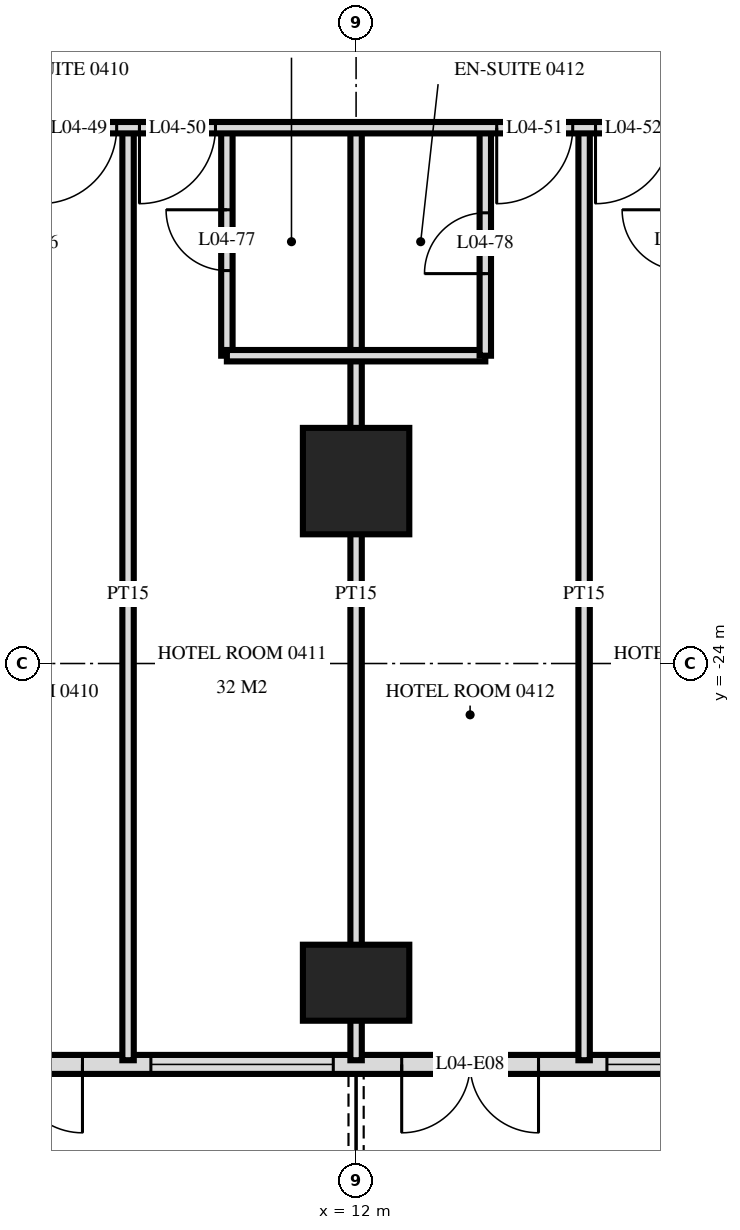
"""IFC4 building model, lengths in metres.
Left out: names, types, materials, properties, quantities, classifications, styles, units other than length and angle.
Written with IfcOpenShell. Run it as: python <this file> out.ifc"""

import sys

from ifc_helpers import new_model, si_unit, direction, frame, frame_2d, origin, origin_2d, place, context, subcontext, project, spatial, rectangle, extrude, element, fill, save


model = new_model("IFC4")
c1 = context("Model", 3, precision=1e-05, world=origin(), true_north=direction((0.0, 1.0)))
c2 = subcontext(c1, "Body", "Model", "MODEL_VIEW")
j1 = project(units=[si_unit("LENGTHUNIT", "METRE"), si_unit("PLANEANGLEUNIT", "RADIAN")], contexts=[c1])
p1 = place(None, origin())
s1 = spatial("IfcSite", under=j1, at=p1, CompositionType="ELEMENT")
p2 = place(p1, origin())
s2 = spatial("IfcBuilding", under=s1, at=p2, CompositionType="ELEMENT")
p3 = place(p2, frame((0.0, 0.0, 24.0)))
s3 = spatial("IfcBuildingStorey", under=s2, at=p3, CompositionType="ELEMENT", Elevation=24.0)
p4 = place(p3, frame((12.0, -28.2, -0.28), z_axis=(0.0, 0.0, 1.0), x_axis=(1.0, 0.0, 0.0)))
e1 = element("IfcColumn", 1, at=p4, inside=s3, PredefinedType="COLUMN", context=c2, shape_type="SweptSolid", body=[
    extrude(rectangle(XDim=1.4, YDim=1.0, at=origin_2d()), origin(), (0.0, 0.0, 1.0), 3.88),
])
p5 = place(p3, frame((12.0, -21.6, -0.28), z_axis=(0.0, 0.0, 1.0), x_axis=(1.0, 0.0, 0.0)))
e2 = element("IfcColumn", 2, at=p5, inside=s3, PredefinedType="COLUMN", context=c2, shape_type="SweptSolid", body=[
    extrude(rectangle(XDim=1.4, YDim=1.4, at=origin_2d()), origin(), (0.0, 0.0, 1.0), 3.88),
])
p6 = place(p3, frame((-28.775, -29.275, 0.0), z_axis=(0.0, 0.0, 1.0), x_axis=(1.0, 0.0, 0.0)))
e3 = element("IfcWall", 3, at=p6, inside=s3, PredefinedType="SOLIDWALL", context=c2, shape_type="SweptSolid", body=[
    extrude(rectangle(XDim=57.551, YDim=0.25, at=frame_2d((28.775, 0.0))), origin(), (0.0, 0.0, 1.0), 3.32),
])
p7 = place(p6, frame((0.575, 0.0, 0.0)))
e4 = element("IfcOpeningElement", 4, at=p7, cuts=e3, PredefinedType="OPENING", context=c2, shape_type="SweptSolid", body=[
    extrude(rectangle(XDim=1.8, YDim=2.4, at=frame_2d((0.9, 1.2))), frame((0.0, 0.135, 0.0), z_axis=(0.0, -1.0, 0.0), x_axis=(1.0, 0.0, 0.0)), (0.0, 0.0, 1.0), 0.27),
])
p8 = place(p6, frame((5.375, 0.0, 0.0)))
e5 = element("IfcOpeningElement", 5, at=p8, cuts=e3, PredefinedType="OPENING", context=c2, shape_type="SweptSolid", body=[
    extrude(rectangle(XDim=1.8, YDim=2.4, at=frame_2d((0.9, 1.2))), frame((0.0, 0.135, 0.0), z_axis=(0.0, -1.0, 0.0), x_axis=(1.0, 0.0, 0.0)), (0.0, 0.0, 1.0), 0.27),
])
p9 = place(p6, frame((8.075, 0.0, 0.3)))
e6 = element("IfcOpeningElement", 6, at=p9, cuts=e3, PredefinedType="OPENING", context=c2, shape_type="SweptSolid", body=[
    extrude(rectangle(XDim=2.4, YDim=2.1, at=frame_2d((1.2, 1.05))), frame((0.0, 0.135, 0.0), z_axis=(0.0, -1.0, 0.0), x_axis=(1.0, 0.0, 0.0)), (0.0, 0.0, 1.0), 0.27),
])
p10 = place(p6, frame((11.375, 0.0, 0.0)))
e7 = element("IfcOpeningElement", 7, at=p10, cuts=e3, PredefinedType="OPENING", context=c2, shape_type="SweptSolid", body=[
    extrude(rectangle(XDim=1.8, YDim=2.4, at=frame_2d((0.9, 1.2))), frame((0.0, 0.135, 0.0), z_axis=(0.0, -1.0, 0.0), x_axis=(1.0, 0.0, 0.0)), (0.0, 0.0, 1.0), 0.27),
])
p11 = place(p6, frame((14.075, 0.0, 0.3)))
e8 = element("IfcOpeningElement", 8, at=p11, cuts=e3, PredefinedType="OPENING", context=c2, shape_type="SweptSolid", body=[
    extrude(rectangle(XDim=2.4, YDim=2.1, at=frame_2d((1.2, 1.05))), frame((0.0, 0.135, 0.0), z_axis=(0.0, -1.0, 0.0), x_axis=(1.0, 0.0, 0.0)), (0.0, 0.0, 1.0), 0.27),
])
p12 = place(p6, frame((17.375, 0.0, 0.0)))
e9 = element("IfcOpeningElement", 9, at=p12, cuts=e3, PredefinedType="OPENING", context=c2, shape_type="SweptSolid", body=[
    extrude(rectangle(XDim=1.8, YDim=2.4, at=frame_2d((0.9, 1.2))), frame((0.0, 0.135, 0.0), z_axis=(0.0, -1.0, 0.0), x_axis=(1.0, 0.0, 0.0)), (0.0, 0.0, 1.0), 0.27),
])
p13 = place(p6, frame((20.075, 0.0, 0.3)))
e10 = element("IfcOpeningElement", 10, at=p13, cuts=e3, PredefinedType="OPENING", context=c2, shape_type="SweptSolid", body=[
    extrude(rectangle(XDim=2.4, YDim=2.1, at=frame_2d((1.2, 1.05))), frame((0.0, 0.135, 0.0), z_axis=(0.0, -1.0, 0.0), x_axis=(1.0, 0.0, 0.0)), (0.0, 0.0, 1.0), 0.27),
])
p14 = place(p6, frame((23.075, 0.0, 0.3)))
e11 = element("IfcOpeningElement", 11, at=p14, cuts=e3, PredefinedType="OPENING", context=c2, shape_type="SweptSolid", body=[
    extrude(rectangle(XDim=2.4, YDim=2.1, at=frame_2d((1.2, 1.05))), frame((0.0, 0.135, 0.0), z_axis=(0.0, -1.0, 0.0), x_axis=(1.0, 0.0, 0.0)), (0.0, 0.0, 1.0), 0.27),
])
p15 = place(p6, frame((26.375, 0.0, 0.0)))
e12 = element("IfcOpeningElement", 12, at=p15, cuts=e3, PredefinedType="OPENING", context=c2, shape_type="SweptSolid", body=[
    extrude(rectangle(XDim=1.8, YDim=2.4, at=frame_2d((0.9, 1.2))), frame((0.0, 0.135, 0.0), z_axis=(0.0, -1.0, 0.0), x_axis=(1.0, 0.0, 0.0)), (0.0, 0.0, 1.0), 0.27),
])
p16 = place(p6, frame((29.375, 0.0, 0.0)))
e13 = element("IfcOpeningElement", 13, at=p16, cuts=e3, PredefinedType="OPENING", context=c2, shape_type="SweptSolid", body=[
    extrude(rectangle(XDim=1.8, YDim=2.4, at=frame_2d((0.9, 1.2))), frame((0.0, 0.135, 0.0), z_axis=(0.0, -1.0, 0.0), x_axis=(1.0, 0.0, 0.0)), (0.0, 0.0, 1.0), 0.27),
])
p17 = place(p6, frame((32.075, 0.0, 0.3)))
e14 = element("IfcOpeningElement", 14, at=p17, cuts=e3, PredefinedType="OPENING", context=c2, shape_type="SweptSolid", body=[
    extrude(rectangle(XDim=2.4, YDim=2.1, at=frame_2d((1.2, 1.05))), frame((0.0, 0.135, 0.0), z_axis=(0.0, -1.0, 0.0), x_axis=(1.0, 0.0, 0.0)), (0.0, 0.0, 1.0), 0.27),
])
p18 = place(p6, frame((35.375, 0.0, 0.0)))
e15 = element("IfcOpeningElement", 15, at=p18, cuts=e3, PredefinedType="OPENING", context=c2, shape_type="SweptSolid", body=[
    extrude(rectangle(XDim=1.8, YDim=2.4, at=frame_2d((0.9, 1.2))), frame((0.0, 0.135, 0.0), z_axis=(0.0, -1.0, 0.0), x_axis=(1.0, 0.0, 0.0)), (0.0, 0.0, 1.0), 0.27),
])
p19 = place(p6, frame((38.075, 0.0, 0.3)))
e16 = element("IfcOpeningElement", 16, at=p19, cuts=e3, PredefinedType="OPENING", context=c2, shape_type="SweptSolid", body=[
    extrude(rectangle(XDim=2.4, YDim=2.1, at=frame_2d((1.2, 1.05))), frame((0.0, 0.135, 0.0), z_axis=(0.0, -1.0, 0.0), x_axis=(1.0, 0.0, 0.0)), (0.0, 0.0, 1.0), 0.27),
])
p20 = place(p6, frame((41.375, 0.0, 0.0)))
e17 = element("IfcOpeningElement", 17, at=p20, cuts=e3, PredefinedType="OPENING", context=c2, shape_type="SweptSolid", body=[
    extrude(rectangle(XDim=1.8, YDim=2.4, at=frame_2d((0.9, 1.2))), frame((0.0, 0.135, 0.0), z_axis=(0.0, -1.0, 0.0), x_axis=(1.0, 0.0, 0.0)), (0.0, 0.0, 1.0), 0.27),
])
p21 = place(p6, frame((44.075, 0.0, 0.3)))
e18 = element("IfcOpeningElement", 18, at=p21, cuts=e3, PredefinedType="OPENING", context=c2, shape_type="SweptSolid", body=[
    extrude(rectangle(XDim=2.4, YDim=2.1, at=frame_2d((1.2, 1.05))), frame((0.0, 0.135, 0.0), z_axis=(0.0, -1.0, 0.0), x_axis=(1.0, 0.0, 0.0)), (0.0, 0.0, 1.0), 0.27),
])
p22 = place(p6, frame((47.075, 0.0, 0.3)))
e19 = element("IfcOpeningElement", 19, at=p22, cuts=e3, PredefinedType="OPENING", context=c2, shape_type="SweptSolid", body=[
    extrude(rectangle(XDim=2.4, YDim=2.1, at=frame_2d((1.2, 1.05))), frame((0.0, 0.135, 0.0), z_axis=(0.0, -1.0, 0.0), x_axis=(1.0, 0.0, 0.0)), (0.0, 0.0, 1.0), 0.27),
])
p23 = place(p6, frame((50.375, 0.0, 0.0)))
e20 = element("IfcOpeningElement", 20, at=p23, cuts=e3, PredefinedType="OPENING", context=c2, shape_type="SweptSolid", body=[
    extrude(rectangle(XDim=1.8, YDim=2.4, at=frame_2d((0.9, 1.2))), frame((0.0, 0.135, 0.0), z_axis=(0.0, -1.0, 0.0), x_axis=(1.0, 0.0, 0.0)), (0.0, 0.0, 1.0), 0.27),
])
p24 = place(p6, frame((53.375, 0.0, 0.0)))
e21 = element("IfcOpeningElement", 21, at=p24, cuts=e3, PredefinedType="OPENING", context=c2, shape_type="SweptSolid", body=[
    extrude(rectangle(XDim=1.8, YDim=2.4, at=frame_2d((0.9, 1.2))), frame((0.0, 0.135, 0.0), z_axis=(0.0, -1.0, 0.0), x_axis=(1.0, 0.0, 0.0)), (0.0, 0.0, 1.0), 0.27),
])
p25 = place(p3, frame((15.0, -29.22, 0.0), z_axis=(0.0, 0.0, 1.0), x_axis=(0.0, 1.0, 0.0)))
e22 = element("IfcWall", 22, at=p25, inside=s3, PredefinedType="PARTITIONING", context=c2, shape_type="SweptSolid", body=[
    extrude(rectangle(XDim=12.27, YDim=0.15, at=frame_2d((6.135, 0.0))), origin(), (0.0, 0.0, 1.0), 3.32),
])
p26 = place(p3, frame((13.7, -19.95, 0.0), z_axis=(0.0, 0.0, 1.0), x_axis=(0.0, 1.0, 0.0)))
e23 = element("IfcWall", 23, at=p26, inside=s3, PredefinedType="PARTITIONING", context=c2, shape_type="SweptSolid", body=[
    extrude(rectangle(XDim=3.0, YDim=0.15, at=frame_2d((1.5, 0.0))), origin(), (0.0, 0.0, 1.0), 3.32),
])
p27 = place(p26, frame((1.08, 0.0, 0.0)))
e24 = element("IfcOpeningElement", 24, at=p27, cuts=e23, PredefinedType="OPENING", context=c2, shape_type="SweptSolid", body=[
    extrude(rectangle(XDim=0.8, YDim=2.1, at=frame_2d((0.4, 1.05))), frame((0.0, 0.085, 0.0), z_axis=(0.0, -1.0, 0.0), x_axis=(1.0, 0.0, 0.0)), (0.0, 0.0, 1.0), 0.17),
])
p28 = place(p3, frame((12.0, -29.22, 0.0), z_axis=(0.0, 0.0, 1.0), x_axis=(0.0, 1.0, 0.0)))
e25 = element("IfcWall", 25, at=p28, inside=s3, PredefinedType="PARTITIONING", context=c2, shape_type="SweptSolid", body=[
    extrude(rectangle(XDim=12.27, YDim=0.15, at=frame_2d((6.135, 0.0))), origin(), (0.0, 0.0, 1.0), 3.32),
])
p29 = place(p3, frame((10.3, -19.95, 0.0), z_axis=(0.0, 0.0, 1.0), x_axis=(0.0, 1.0, 0.0)))
e26 = element("IfcWall", 26, at=p29, inside=s3, PredefinedType="PARTITIONING", context=c2, shape_type="SweptSolid", body=[
    extrude(rectangle(XDim=3.0, YDim=0.15, at=frame_2d((1.5, 0.0))), origin(), (0.0, 0.0, 1.0), 3.32),
])
p30 = place(p29, frame((1.12, 0.0, 0.0)))
e27 = element("IfcOpeningElement", 27, at=p30, cuts=e26, PredefinedType="OPENING", context=c2, shape_type="SweptSolid", body=[
    extrude(rectangle(XDim=0.8, YDim=2.1, at=frame_2d((0.4, 1.05))), frame((0.0, 0.085, 0.0), z_axis=(0.0, -1.0, 0.0), x_axis=(1.0, 0.0, 0.0)), (0.0, 0.0, 1.0), 0.17),
])
p31 = place(p3, frame((9.0, -29.22, 0.0), z_axis=(0.0, 0.0, 1.0), x_axis=(0.0, 1.0, 0.0)))
e28 = element("IfcWall", 28, at=p31, inside=s3, PredefinedType="PARTITIONING", context=c2, shape_type="SweptSolid", body=[
    extrude(rectangle(XDim=12.27, YDim=0.15, at=frame_2d((6.135, 0.0))), origin(), (0.0, 0.0, 1.0), 3.32),
])
p32 = place(p3, frame((10.3, -19.95, 0.0), z_axis=(0.0, 0.0, 1.0), x_axis=(1.0, 0.0, 0.0)))
e29 = element("IfcWall", 29, at=p32, inside=s3, PredefinedType="PARTITIONING", context=c2, shape_type="SweptSolid", body=[
    extrude(rectangle(XDim=3.4, YDim=0.15, at=frame_2d((1.7, 0.0))), origin(), (0.0, 0.0, 1.0), 3.32),
])
p33 = place(p3, frame((-33.12, -16.95, 0.0), z_axis=(0.0, 0.0, 1.0), x_axis=(1.0, 0.0, 0.0)))
e30 = element("IfcWall", 30, at=p33, inside=s3, PredefinedType="PARTITIONING", context=c2, shape_type="SweptSolid", body=[
    extrude(rectangle(XDim=66.24, YDim=0.15, at=frame_2d((33.12, 0.0))), origin(), (0.0, 0.0, 1.0), 3.32),
])
p34 = place(p33, frame((9.27, 0.0, 0.0)))
e31 = element("IfcOpeningElement", 31, at=p34, cuts=e30, PredefinedType="OPENING", context=c2, shape_type="SweptSolid", body=[
    extrude(rectangle(XDim=1.0, YDim=2.1, at=frame_2d((0.5, 1.05))), frame((0.0, 0.085, 0.0), z_axis=(0.0, -1.0, 0.0), x_axis=(1.0, 0.0, 0.0)), (0.0, 0.0, 1.0), 0.17),
])
p35 = place(p33, frame((13.97, 0.0, 0.0)))
e32 = element("IfcOpeningElement", 32, at=p35, cuts=e30, PredefinedType="OPENING", context=c2, shape_type="SweptSolid", body=[
    extrude(rectangle(XDim=1.0, YDim=2.1, at=frame_2d((0.5, 1.05))), frame((0.0, 0.085, 0.0), z_axis=(0.0, -1.0, 0.0), x_axis=(1.0, 0.0, 0.0)), (0.0, 0.0, 1.0), 0.17),
])
p36 = place(p33, frame((15.27, 0.0, 0.0)))
e33 = element("IfcOpeningElement", 33, at=p36, cuts=e30, PredefinedType="OPENING", context=c2, shape_type="SweptSolid", body=[
    extrude(rectangle(XDim=1.0, YDim=2.1, at=frame_2d((0.5, 1.05))), frame((0.0, 0.085, 0.0), z_axis=(0.0, -1.0, 0.0), x_axis=(1.0, 0.0, 0.0)), (0.0, 0.0, 1.0), 0.17),
])
p37 = place(p33, frame((19.97, 0.0, 0.0)))
e34 = element("IfcOpeningElement", 34, at=p37, cuts=e30, PredefinedType="OPENING", context=c2, shape_type="SweptSolid", body=[
    extrude(rectangle(XDim=1.0, YDim=2.1, at=frame_2d((0.5, 1.05))), frame((0.0, 0.085, 0.0), z_axis=(0.0, -1.0, 0.0), x_axis=(1.0, 0.0, 0.0)), (0.0, 0.0, 1.0), 0.17),
])
p38 = place(p33, frame((22.27, 0.0, 0.0)))
e35 = element("IfcOpeningElement", 35, at=p38, cuts=e30, PredefinedType="OPENING", context=c2, shape_type="SweptSolid", body=[
    extrude(rectangle(XDim=1.0, YDim=2.1, at=frame_2d((0.5, 1.05))), frame((0.0, 0.085, 0.0), z_axis=(0.0, -1.0, 0.0), x_axis=(1.0, 0.0, 0.0)), (0.0, 0.0, 1.0), 0.17),
])
p39 = place(p33, frame((28.97, 0.0, 0.0)))
e36 = element("IfcOpeningElement", 36, at=p39, cuts=e30, PredefinedType="OPENING", context=c2, shape_type="SweptSolid", body=[
    extrude(rectangle(XDim=1.0, YDim=2.1, at=frame_2d((0.5, 1.05))), frame((0.0, 0.085, 0.0), z_axis=(0.0, -1.0, 0.0), x_axis=(1.0, 0.0, 0.0)), (0.0, 0.0, 1.0), 0.17),
])
p40 = place(p33, frame((30.27, 0.0, 0.0)))
e37 = element("IfcOpeningElement", 37, at=p40, cuts=e30, PredefinedType="OPENING", context=c2, shape_type="SweptSolid", body=[
    extrude(rectangle(XDim=1.0, YDim=2.1, at=frame_2d((0.5, 1.05))), frame((0.0, 0.085, 0.0), z_axis=(0.0, -1.0, 0.0), x_axis=(1.0, 0.0, 0.0)), (0.0, 0.0, 1.0), 0.17),
])
p41 = place(p33, frame((34.97, 0.0, 0.0)))
e38 = element("IfcOpeningElement", 38, at=p41, cuts=e30, PredefinedType="OPENING", context=c2, shape_type="SweptSolid", body=[
    extrude(rectangle(XDim=1.0, YDim=2.1, at=frame_2d((0.5, 1.05))), frame((0.0, 0.085, 0.0), z_axis=(0.0, -1.0, 0.0), x_axis=(1.0, 0.0, 0.0)), (0.0, 0.0, 1.0), 0.17),
])
p42 = place(p33, frame((36.27, 0.0, 0.0)))
e39 = element("IfcOpeningElement", 39, at=p42, cuts=e30, PredefinedType="OPENING", context=c2, shape_type="SweptSolid", body=[
    extrude(rectangle(XDim=1.0, YDim=2.1, at=frame_2d((0.5, 1.05))), frame((0.0, 0.085, 0.0), z_axis=(0.0, -1.0, 0.0), x_axis=(1.0, 0.0, 0.0)), (0.0, 0.0, 1.0), 0.17),
])
p43 = place(p33, frame((40.97, 0.0, 0.0)))
e40 = element("IfcOpeningElement", 40, at=p43, cuts=e30, PredefinedType="OPENING", context=c2, shape_type="SweptSolid", body=[
    extrude(rectangle(XDim=1.0, YDim=2.1, at=frame_2d((0.5, 1.05))), frame((0.0, 0.085, 0.0), z_axis=(0.0, -1.0, 0.0), x_axis=(1.0, 0.0, 0.0)), (0.0, 0.0, 1.0), 0.17),
])
p44 = place(p33, frame((42.27, 0.0, 0.0)))
e41 = element("IfcOpeningElement", 41, at=p44, cuts=e30, PredefinedType="OPENING", context=c2, shape_type="SweptSolid", body=[
    extrude(rectangle(XDim=1.0, YDim=2.1, at=frame_2d((0.5, 1.05))), frame((0.0, 0.085, 0.0), z_axis=(0.0, -1.0, 0.0), x_axis=(1.0, 0.0, 0.0)), (0.0, 0.0, 1.0), 0.17),
])
p45 = place(p33, frame((46.97, 0.0, 0.0)))
e42 = element("IfcOpeningElement", 42, at=p45, cuts=e30, PredefinedType="OPENING", context=c2, shape_type="SweptSolid", body=[
    extrude(rectangle(XDim=1.0, YDim=2.1, at=frame_2d((0.5, 1.05))), frame((0.0, 0.085, 0.0), z_axis=(0.0, -1.0, 0.0), x_axis=(1.0, 0.0, 0.0)), (0.0, 0.0, 1.0), 0.17),
])
p46 = place(p33, frame((48.27, 0.0, 0.0)))
e43 = element("IfcOpeningElement", 43, at=p46, cuts=e30, PredefinedType="OPENING", context=c2, shape_type="SweptSolid", body=[
    extrude(rectangle(XDim=1.0, YDim=2.1, at=frame_2d((0.5, 1.05))), frame((0.0, 0.085, 0.0), z_axis=(0.0, -1.0, 0.0), x_axis=(1.0, 0.0, 0.0)), (0.0, 0.0, 1.0), 0.17),
])
p47 = place(p33, frame((52.97, 0.0, 0.0)))
e44 = element("IfcOpeningElement", 44, at=p47, cuts=e30, PredefinedType="OPENING", context=c2, shape_type="SweptSolid", body=[
    extrude(rectangle(XDim=1.0, YDim=2.1, at=frame_2d((0.5, 1.05))), frame((0.0, 0.085, 0.0), z_axis=(0.0, -1.0, 0.0), x_axis=(1.0, 0.0, 0.0)), (0.0, 0.0, 1.0), 0.17),
])
p48 = place(p33, frame((54.27, 0.0, 0.0)))
e45 = element("IfcOpeningElement", 45, at=p48, cuts=e30, PredefinedType="OPENING", context=c2, shape_type="SweptSolid", body=[
    extrude(rectangle(XDim=1.0, YDim=2.1, at=frame_2d((0.5, 1.05))), frame((0.0, 0.085, 0.0), z_axis=(0.0, -1.0, 0.0), x_axis=(1.0, 0.0, 0.0)), (0.0, 0.0, 1.0), 0.17),
])
p49 = place(p33, frame((4.4, 0.0, 0.0)))
e46 = element("IfcOpeningElement", 46, at=p49, cuts=e30, PredefinedType="OPENING", context=c2, shape_type="SweptSolid", body=[
    extrude(rectangle(XDim=1.0, YDim=2.1, at=frame_2d((0.5, 1.05))), frame((0.0, 0.085, 0.0), z_axis=(0.0, -1.0, 0.0), x_axis=(1.0, 0.0, 0.0)), (0.0, 0.0, 1.0), 0.17),
])
p50 = place(p33, frame((60.8, 0.0, 0.0)))
e47 = element("IfcOpeningElement", 47, at=p50, cuts=e30, PredefinedType="OPENING", context=c2, shape_type="SweptSolid", body=[
    extrude(rectangle(XDim=1.0, YDim=2.1, at=frame_2d((0.5, 1.05))), frame((0.0, 0.085, 0.0), z_axis=(0.0, -1.0, 0.0), x_axis=(1.0, 0.0, 0.0)), (0.0, 0.0, 1.0), 0.17),
])
p51 = place(p18, frame((0.9, 0.0, 0.0), z_axis=(0.0, 0.0, 1.0), x_axis=(-1.0, 0.0, 0.0)))
e48 = element("IfcDoor", 48, at=p51, inside=s3, OperationType="DOUBLE_DOOR_SINGLE_SWING", PredefinedType="DOOR", context=c2, shape_type="SweptSolid", body=[
    extrude(rectangle(XDim=1.8, YDim=2.4, at=frame_2d((0.0, 1.2))), frame((0.0, -0.025, 0.0), z_axis=(0.0, 1.0, 0.0), x_axis=(-1.0, 0.0, 0.0)), (0.0, 0.0, 1.0), 0.05),
])
fill(e15, e48)
p52 = place(p19, origin())
e49 = element("IfcWindow", 49, at=p52, inside=s3, PartitioningType="SINGLE_PANEL", PredefinedType="WINDOW", context=c2, shape_type="SweptSolid", body=[
    extrude(rectangle(XDim=2.4, YDim=2.1, at=frame_2d((1.2, 1.05))), frame((0.0, 0.03, 0.0), z_axis=(0.0, -1.0, 0.0), x_axis=(1.0, 0.0, 0.0)), (0.0, 0.0, 1.0), 0.06),
])
fill(e16, e49)
p53 = place(p20, frame((0.9, 0.0, 0.0), z_axis=(0.0, 0.0, 1.0), x_axis=(-1.0, 0.0, 0.0)))
e50 = element("IfcDoor", 50, at=p53, inside=s3, OperationType="DOUBLE_DOOR_SINGLE_SWING", PredefinedType="DOOR", context=c2, shape_type="SweptSolid", body=[
    extrude(rectangle(XDim=1.8, YDim=2.4, at=frame_2d((0.0, 1.2))), frame((0.0, -0.025, 0.0), z_axis=(0.0, 1.0, 0.0), x_axis=(-1.0, 0.0, 0.0)), (0.0, 0.0, 1.0), 0.05),
])
fill(e17, e50)
p54 = place(p21, origin())
e51 = element("IfcWindow", 51, at=p54, inside=s3, PartitioningType="SINGLE_PANEL", PredefinedType="WINDOW", context=c2, shape_type="SweptSolid", body=[
    extrude(rectangle(XDim=2.4, YDim=2.1, at=frame_2d((1.2, 1.05))), frame((0.0, 0.03, 0.0), z_axis=(0.0, -1.0, 0.0), x_axis=(1.0, 0.0, 0.0)), (0.0, 0.0, 1.0), 0.06),
])
fill(e18, e51)
p55 = place(p43, frame((0.5, 0.0, 0.0), z_axis=(0.0, 0.0, 1.0), x_axis=(-1.0, 0.0, 0.0)))
e52 = element("IfcDoor", 52, at=p55, inside=s3, OperationType="SINGLE_SWING_LEFT", PredefinedType="DOOR", context=c2, shape_type="SweptSolid", body=[
    extrude(rectangle(XDim=1.0, YDim=2.1, at=frame_2d((0.0, 1.05))), frame((0.0, -0.025, 0.0), z_axis=(0.0, 1.0, 0.0), x_axis=(-1.0, 0.0, 0.0)), (0.0, 0.0, 1.0), 0.05),
])
fill(e40, e52)
p56 = place(p44, frame((0.5, 0.0, 0.0), z_axis=(0.0, 0.0, 1.0), x_axis=(-1.0, 0.0, 0.0)))
e53 = element("IfcDoor", 53, at=p56, inside=s3, OperationType="SINGLE_SWING_LEFT", PredefinedType="DOOR", context=c2, shape_type="SweptSolid", body=[
    extrude(rectangle(XDim=1.0, YDim=2.1, at=frame_2d((0.0, 1.05))), frame((0.0, -0.025, 0.0), z_axis=(0.0, 1.0, 0.0), x_axis=(-1.0, 0.0, 0.0)), (0.0, 0.0, 1.0), 0.05),
])
fill(e41, e53)
p57 = place(p45, frame((0.5, 0.0, 0.0), z_axis=(0.0, 0.0, 1.0), x_axis=(-1.0, 0.0, 0.0)))
e54 = element("IfcDoor", 54, at=p57, inside=s3, OperationType="SINGLE_SWING_LEFT", PredefinedType="DOOR", context=c2, shape_type="SweptSolid", body=[
    extrude(rectangle(XDim=1.0, YDim=2.1, at=frame_2d((0.0, 1.05))), frame((0.0, -0.025, 0.0), z_axis=(0.0, 1.0, 0.0), x_axis=(-1.0, 0.0, 0.0)), (0.0, 0.0, 1.0), 0.05),
])
fill(e42, e54)
p58 = place(p46, frame((0.5, 0.0, 0.0), z_axis=(0.0, 0.0, 1.0), x_axis=(-1.0, 0.0, 0.0)))
e55 = element("IfcDoor", 55, at=p58, inside=s3, OperationType="SINGLE_SWING_LEFT", PredefinedType="DOOR", context=c2, shape_type="SweptSolid", body=[
    extrude(rectangle(XDim=1.0, YDim=2.1, at=frame_2d((0.0, 1.05))), frame((0.0, -0.025, 0.0), z_axis=(0.0, 1.0, 0.0), x_axis=(-1.0, 0.0, 0.0)), (0.0, 0.0, 1.0), 0.05),
])
fill(e43, e55)
p59 = place(p30, origin())
e56 = element("IfcDoor", 56, at=p59, inside=s3, OperationType="SINGLE_SWING_LEFT", PredefinedType="DOOR", context=c2, shape_type="SweptSolid", body=[
    extrude(rectangle(XDim=0.8, YDim=2.1, at=frame_2d((0.4, 1.05))), frame((0.0, 0.025, 0.0), z_axis=(0.0, -1.0, 0.0), x_axis=(1.0, 0.0, 0.0)), (0.0, 0.0, 1.0), 0.05),
])
fill(e27, e56)
p60 = place(p27, origin())
e57 = element("IfcDoor", 57, at=p60, inside=s3, OperationType="SINGLE_SWING_RIGHT", PredefinedType="DOOR", context=c2, shape_type="SweptSolid", body=[
    extrude(rectangle(XDim=0.8, YDim=2.1, at=frame_2d((0.4, 1.05))), frame((0.0, 0.025, 0.0), z_axis=(0.0, -1.0, 0.0), x_axis=(1.0, 0.0, 0.0)), (0.0, 0.0, 1.0), 0.05),
])
fill(e24, e57)
save(model, sys.argv[1])
